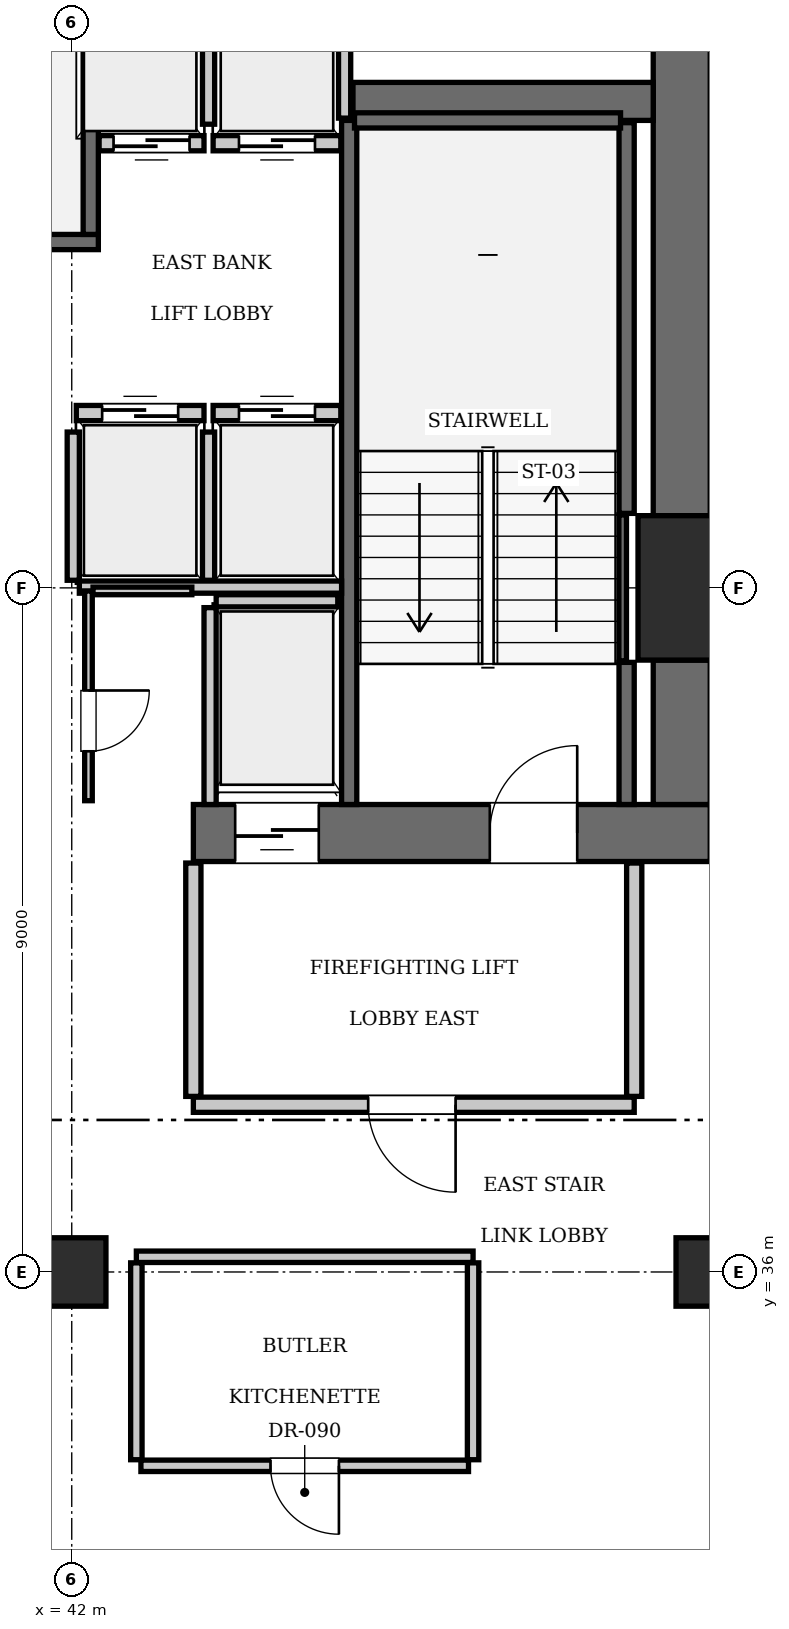
"""IFC4 building model, lengths in metres.
Left out: names, types, materials, properties, quantities, classifications, styles, units other than length and angle.
Written with IfcOpenShell. Run it as: python <this file> out.ifc"""

import sys

from ifc_helpers import new_model, si_unit, direction, frame, frame_2d, origin, origin_2d, place, context, subcontext, project, spatial, rectangle, extrude, element, fill, save


model = new_model("IFC4")
c1 = context("Model", 3, precision=1e-05, world=origin(), true_north=direction((0.0, 1.0)))
c2 = subcontext(c1, "Body", "Model", "MODEL_VIEW")
j1 = project(units=[si_unit("LENGTHUNIT", "METRE"), si_unit("PLANEANGLEUNIT", "RADIAN")], contexts=[c1])
p1 = place(None, origin())
s1 = spatial("IfcSite", under=j1, at=p1, CompositionType="ELEMENT")
p2 = place(p1, origin())
s2 = spatial("IfcBuilding", under=s1, at=p2, CompositionType="ELEMENT")
p3 = place(p2, frame((0.0, 0.0, 146.65)))
s3 = spatial("IfcBuildingStorey", under=s2, at=p3, CompositionType="ELEMENT", Elevation=146.65)
p4 = place(p3, frame((50.4, 45.0, 0.0), z_axis=(0.0, 0.0, 1.0), x_axis=(1.0, 0.0, 0.0)))
e1 = element("IfcColumn", 1, at=p4, inside=s3, PredefinedType="COLUMN", context=c2, shape_type="SweptSolid", body=[
    extrude(rectangle(XDim=1.9, YDim=1.9, at=origin_2d()), origin(), (0.0, 0.0, 1.0), 3.85),
])
p5 = place(p3, frame((43.6, 41.775, 0.0), z_axis=(0.0, 0.0, 1.0), x_axis=(1.0, 0.0, 0.0)))
e2 = element("IfcWall", 2, at=p5, inside=s3, PredefinedType="SHEAR", context=c2, shape_type="SweptSolid", body=[
    extrude(rectangle(XDim=6.8, YDim=0.75, at=frame_2d((3.4, 0.0))), origin(), (0.0, 0.0, 1.0), 3.85),
])
p6 = place(p5, frame((3.9, 0.0, 0.0)))
e3 = element("IfcOpeningElement", 3, at=p6, cuts=e2, PredefinedType="OPENING", context=c2, shape_type="SweptSolid", body=[
    extrude(rectangle(XDim=1.15, YDim=2.15, at=frame_2d((0.575, 1.075))), frame((0.0, 0.385, 0.0), z_axis=(0.0, -1.0, 0.0), x_axis=(1.0, 0.0, 0.0)), (0.0, 0.0, 1.0), 0.77),
])
p7 = place(p5, frame((0.55, 0.0, 0.0)))
e4 = element("IfcOpeningElement", 4, at=p7, cuts=e2, PredefinedType="OPENING", context=c2, shape_type="SweptSolid", body=[
    extrude(rectangle(XDim=1.1, YDim=2.2, at=frame_2d((0.55, 1.1))), frame((0.0, 0.385, 0.0), z_axis=(0.0, -1.0, 0.0), x_axis=(1.0, 0.0, 0.0)), (0.0, 0.0, 1.0), 0.77),
])
p8 = place(p3, frame((50.025, 42.15, 0.0), z_axis=(0.0, 0.0, 1.0), x_axis=(0.0, 1.0, 0.0)))
e5 = element("IfcWall", 5, at=p8, inside=s3, PredefinedType="SHEAR", context=c2, shape_type="SweptSolid", body=[
    extrude(rectangle(XDim=1.9, YDim=0.75, at=frame_2d((0.95, 0.0))), origin(), (0.0, 0.0, 1.0), 3.85),
])
p9 = place(p3, frame((50.025, 45.95, 0.0), z_axis=(0.0, 0.0, 1.0), x_axis=(0.0, 1.0, 0.0)))
e6 = element("IfcWall", 6, at=p9, inside=s3, PredefinedType="SHEAR", context=c2, shape_type="SweptSolid", body=[
    extrude(rectangle(XDim=7.3, YDim=0.75, at=frame_2d((3.65, 0.0))), origin(), (0.0, 0.0, 1.0), 3.85),
])
p10 = place(p3, frame((45.7, 51.4, 0.0), z_axis=(0.0, 0.0, 1.0), x_axis=(1.0, 0.0, 0.0)))
e7 = element("IfcWall", 7, at=p10, inside=s3, PredefinedType="SHEAR", context=c2, shape_type="SweptSolid", body=[
    extrude(rectangle(XDim=3.95, YDim=0.5, at=frame_2d((1.975, 0.0))), origin(), (0.0, 0.0, 1.0), 3.85),
])
for number, where, z_axis, x_axis in (
    (8, (42.0, 36.0, 0.0), (0.0, 0.0, 1.0), (1.0, 0.0, 0.0)),
    (9, (50.4, 36.0, 0.0), (0.0, 0.0, 1.0), (1.0, 0.0, 0.0)),
):
    element("IfcColumn", number, at=place(p3, frame(where, z_axis=z_axis, x_axis=x_axis)), inside=s3, PredefinedType="COLUMN", context=c2, shape_type="SweptSolid", body=[
        extrude(rectangle(XDim=0.9, YDim=0.9, at=origin_2d()), origin(), (0.0, 0.0, 1.0), 3.85),
    ])
p11 = place(p3, frame((33.25, 49.55, 0.0), z_axis=(0.0, 0.0, 1.0), x_axis=(1.0, 0.0, 0.0)))
e10 = element("IfcWall", 10, at=p11, inside=s3, PredefinedType="SOLIDWALL", context=c2, shape_type="SweptSolid", body=[
    extrude(rectangle(XDim=9.1, YDim=0.2, at=frame_2d((4.55, 0.0))), origin(), (0.0, 0.0, 1.0), 3.61),
])
p12 = place(p3, frame((42.25, 49.65, 0.0), z_axis=(0.0, 0.0, 1.0), x_axis=(0.0, 1.0, 0.0)))
e11 = element("IfcWall", 11, at=p12, inside=s3, PredefinedType="SOLIDWALL", context=c2, shape_type="SweptSolid", body=[
    extrude(rectangle(XDim=3.6, YDim=0.2, at=frame_2d((1.8, 0.0))), origin(), (0.0, 0.0, 1.0), 3.61),
])
p13 = place(p3, frame((45.65, 42.15, 0.0), z_axis=(0.0, 0.0, 1.0), x_axis=(0.0, 1.0, 0.0)))
e12 = element("IfcWall", 12, at=p13, inside=s3, PredefinedType="SOLIDWALL", context=c2, shape_type="SweptSolid", body=[
    extrude(rectangle(XDim=9.0, YDim=0.2, at=frame_2d((4.5, 0.0))), origin(), (0.0, 0.0, 1.0), 3.61),
])
p14 = place(p3, frame((49.3, 42.15, 0.0), z_axis=(0.0, 0.0, 1.0), x_axis=(0.0, 1.0, 0.0)))
e13 = element("IfcWall", 13, at=p14, inside=s3, PredefinedType="SOLIDWALL", context=c2, shape_type="SweptSolid", body=[
    extrude(rectangle(XDim=1.87, YDim=0.2, at=frame_2d((0.935, 0.0))), origin(), (0.0, 0.0, 1.0), 3.61),
])
p15 = place(p3, frame((49.3, 45.98, 0.0), z_axis=(0.0, 0.0, 1.0), x_axis=(0.0, 1.0, 0.0)))
e14 = element("IfcWall", 14, at=p15, inside=s3, PredefinedType="SOLIDWALL", context=c2, shape_type="SweptSolid", body=[
    extrude(rectangle(XDim=5.14, YDim=0.2, at=frame_2d((2.57, 0.0))), origin(), (0.0, 0.0, 1.0), 3.61),
])
p16 = place(p3, frame((45.72, 51.15, 0.0), z_axis=(0.0, 0.0, 1.0), x_axis=(1.0, 0.0, 0.0)))
e15 = element("IfcWall", 15, at=p16, inside=s3, PredefinedType="SOLIDWALL", context=c2, shape_type="SweptSolid", body=[
    extrude(rectangle(XDim=3.5, YDim=0.2, at=frame_2d((1.75, 0.0))), origin(), (0.0, 0.0, 1.0), 3.61),
])
p17 = place(p3, frame((49.248, 44.04, 0.0), z_axis=(0.0, 0.0, 1.0), x_axis=(0.0, 1.0, 0.0)))
e16 = element("IfcWall", 16, at=p17, inside=s3, PredefinedType="SOLIDWALL", context=c2, shape_type="SweptSolid", body=[
    extrude(rectangle(XDim=1.92, YDim=0.1, at=frame_2d((0.96, 0.0))), origin(), (0.0, 0.0, 1.0), 3.61),
])
p18 = place(p3, frame((42.06, 47.3, 0.0), z_axis=(0.0, 0.0, 1.0), x_axis=(1.0, 0.0, 0.0)))
e17 = element("IfcWall", 17, at=p18, inside=s3, PredefinedType="SOLIDWALL", context=c2, shape_type="SweptSolid", body=[
    extrude(rectangle(XDim=1.68, YDim=0.2, at=frame_2d((0.84, 0.0))), origin(), (0.0, 0.0, 1.0), 3.61),
])
p19 = place(p18, frame((0.34, 0.0, 0.0)))
e18 = element("IfcOpeningElement", 18, at=p19, cuts=e17, PredefinedType="OPENING", context=c2, shape_type="SweptSolid", body=[
    extrude(rectangle(XDim=1.0, YDim=2.15, at=frame_2d((0.5, 1.075))), frame((0.0, 0.11, 0.0), z_axis=(0.0, -1.0, 0.0), x_axis=(1.0, 0.0, 0.0)), (0.0, 0.0, 1.0), 0.22),
])
p20 = place(p3, frame((43.86, 47.3, 0.0), z_axis=(0.0, 0.0, 1.0), x_axis=(1.0, 0.0, 0.0)))
e19 = element("IfcWall", 19, at=p20, inside=s3, PredefinedType="SOLIDWALL", context=c2, shape_type="SweptSolid", body=[
    extrude(rectangle(XDim=1.68, YDim=0.2, at=frame_2d((0.84, 0.0))), origin(), (0.0, 0.0, 1.0), 3.61),
])
p21 = place(p20, frame((0.34, 0.0, 0.0)))
e20 = element("IfcOpeningElement", 20, at=p21, cuts=e19, PredefinedType="OPENING", context=c2, shape_type="SweptSolid", body=[
    extrude(rectangle(XDim=1.0, YDim=2.15, at=frame_2d((0.5, 1.075))), frame((0.0, 0.11, 0.0), z_axis=(0.0, -1.0, 0.0), x_axis=(1.0, 0.0, 0.0)), (0.0, 0.0, 1.0), 0.22),
])
p22 = place(p3, frame((42.36, 50.85, 0.0), z_axis=(0.0, 0.0, 1.0), x_axis=(1.0, 0.0, 0.0)))
e21 = element("IfcWall", 21, at=p22, inside=s3, PredefinedType="SOLIDWALL", context=c2, shape_type="SweptSolid", body=[
    extrude(rectangle(XDim=1.38, YDim=0.2, at=frame_2d((0.69, 0.0))), origin(), (0.0, 0.0, 1.0), 3.61),
])
p23 = place(p22, frame((0.19, 0.0, 0.0)))
e22 = element("IfcOpeningElement", 22, at=p23, cuts=e21, PredefinedType="OPENING", context=c2, shape_type="SweptSolid", body=[
    extrude(rectangle(XDim=1.0, YDim=2.15, at=frame_2d((0.5, 1.075))), frame((0.0, 0.11, 0.0), z_axis=(0.0, -1.0, 0.0), x_axis=(1.0, 0.0, 0.0)), (0.0, 0.0, 1.0), 0.22),
])
p24 = place(p3, frame((43.86, 50.85, 0.0), z_axis=(0.0, 0.0, 1.0), x_axis=(1.0, 0.0, 0.0)))
e23 = element("IfcWall", 23, at=p24, inside=s3, PredefinedType="SOLIDWALL", context=c2, shape_type="SweptSolid", body=[
    extrude(rectangle(XDim=1.68, YDim=0.2, at=frame_2d((0.84, 0.0))), origin(), (0.0, 0.0, 1.0), 3.61),
])
p25 = place(p24, frame((0.34, 0.0, 0.0)))
e24 = element("IfcOpeningElement", 24, at=p25, cuts=e23, PredefinedType="OPENING", context=c2, shape_type="SweptSolid", body=[
    extrude(rectangle(XDim=1.0, YDim=2.15, at=frame_2d((0.5, 1.075))), frame((0.0, 0.11, 0.0), z_axis=(0.0, -1.0, 0.0), x_axis=(1.0, 0.0, 0.0)), (0.0, 0.0, 1.0), 0.22),
])
p26 = place(p3, frame((43.9, 44.83, 0.0), z_axis=(0.0, 0.0, 1.0), x_axis=(1.0, 0.0, 0.0)))
e25 = element("IfcWall", 25, at=p26, inside=s3, PredefinedType="SOLIDWALL", context=c2, shape_type="SweptSolid", body=[
    extrude(rectangle(XDim=1.6, YDim=0.16, at=frame_2d((0.8, 0.0))), origin(), (0.0, 0.0, 1.0), 3.61),
])
p27 = place(p3, frame((43.82, 42.15, 0.0), z_axis=(0.0, 0.0, 1.0), x_axis=(0.0, 1.0, 0.0)))
e26 = element("IfcWall", 26, at=p27, inside=s3, PredefinedType="SOLIDWALL", context=c2, shape_type="SweptSolid", body=[
    extrude(rectangle(XDim=2.59, YDim=0.16, at=frame_2d((1.295, 0.0))), origin(), (0.0, 0.0, 1.0), 3.61),
])
for number, where, z_axis, x_axis in (
    (27, (42.02, 45.1, 0.0), (0.0, 0.0, 1.0), (0.0, 1.0, 0.0)),
    (28, (43.8, 45.1, 0.0), (0.0, 0.0, 1.0), (0.0, 1.0, 0.0)),
):
    element("IfcWall", number, at=place(p3, frame(where, z_axis=z_axis, x_axis=x_axis)), inside=s3, PredefinedType="SOLIDWALL", context=c2, shape_type="SweptSolid", body=[
        extrude(rectangle(XDim=1.95, YDim=0.16, at=frame_2d((0.975, 0.0))), origin(), (0.0, 0.0, 1.0), 3.61),
    ])
p28 = place(p3, frame((42.1, 45.01, 0.0), z_axis=(0.0, 0.0, 1.0), x_axis=(1.0, 0.0, 0.0)))
e29 = element("IfcWall", 29, at=p28, inside=s3, PredefinedType="SOLIDWALL", context=c2, shape_type="SweptSolid", body=[
    extrude(rectangle(XDim=3.45, YDim=0.16, at=frame_2d((1.725, 0.0))), origin(), (0.0, 0.0, 1.0), 3.61),
])
p29 = place(p3, frame((45.59, 51.18, 0.0), z_axis=(0.0, 0.0, 1.0), x_axis=(0.0, 1.0, 0.0)))
e30 = element("IfcWall", 30, at=p29, inside=s3, PredefinedType="SOLIDWALL", context=c2, shape_type="SweptSolid", body=[
    extrude(rectangle(XDim=2.07, YDim=0.16, at=frame_2d((1.035, 0.0))), origin(), (0.0, 0.0, 1.0), 3.61),
])
p30 = place(p3, frame((43.8, 51.1, 0.0), z_axis=(0.0, 0.0, 1.0), x_axis=(0.0, 1.0, 0.0)))
e31 = element("IfcWall", 31, at=p30, inside=s3, PredefinedType="SOLIDWALL", context=c2, shape_type="SweptSolid", body=[
    extrude(rectangle(XDim=2.15, YDim=0.16, at=frame_2d((1.075, 0.0))), origin(), (0.0, 0.0, 1.0), 3.61),
])
p31 = place(p3, frame((43.6, 38.2, 0.0), z_axis=(0.0, 0.0, 1.0), x_axis=(1.0, 0.0, 0.0)))
e32 = element("IfcWall", 32, at=p31, inside=s3, PredefinedType="PARTITIONING", context=c2, shape_type="SweptSolid", body=[
    extrude(rectangle(XDim=5.8, YDim=0.2, at=frame_2d((2.9, 0.0))), origin(), (0.0, 0.0, 1.0), 3.61),
])
p32 = place(p31, frame((2.3, 0.0, 0.0)))
e33 = element("IfcOpeningElement", 33, at=p32, cuts=e32, PredefinedType="OPENING", context=c2, shape_type="SweptSolid", body=[
    extrude(rectangle(XDim=1.15, YDim=2.15, at=frame_2d((0.575, 1.075))), frame((0.0, 0.11, 0.0), z_axis=(0.0, -1.0, 0.0), x_axis=(1.0, 0.0, 0.0)), (0.0, 0.0, 1.0), 0.22),
])
for number, where, z_axis, x_axis in (
    (34, (43.6, 38.31, 0.0), (0.0, 0.0, 1.0), (0.0, 1.0, 0.0)),
    (35, (49.4, 38.31, 0.0), (0.0, 0.0, 1.0), (0.0, 1.0, 0.0)),
):
    element("IfcWall", number, at=place(p3, frame(where, z_axis=z_axis, x_axis=x_axis)), inside=s3, PredefinedType="PARTITIONING", context=c2, shape_type="SweptSolid", body=[
        extrude(rectangle(XDim=3.07, YDim=0.2, at=frame_2d((1.535, 0.0))), origin(), (0.0, 0.0, 1.0), 3.61),
    ])
p33 = place(p3, frame((42.22, 42.2, 0.0), z_axis=(0.0, 0.0, 1.0), x_axis=(0.0, 1.0, 0.0)))
e36 = element("IfcWall", 36, at=p33, inside=s3, PredefinedType="PARTITIONING", context=c2, shape_type="SweptSolid", body=[
    extrude(rectangle(XDim=2.76, YDim=0.1, at=frame_2d((1.38, 0.0))), origin(), (0.0, 0.0, 1.0), 3.61),
])
p34 = place(p33, frame((0.65, 0.0, 0.0)))
e37 = element("IfcOpeningElement", 37, at=p34, cuts=e36, PredefinedType="OPENING", context=c2, shape_type="SweptSolid", body=[
    extrude(rectangle(XDim=0.8, YDim=2.05, at=frame_2d((0.4, 1.025))), frame((0.0, 0.06, 0.0), z_axis=(0.0, -1.0, 0.0), x_axis=(1.0, 0.0, 0.0)), (0.0, 0.0, 1.0), 0.12),
])
p35 = place(p3, frame((42.28, 44.96, 0.0), z_axis=(0.0, 0.0, 1.0), x_axis=(1.0, 0.0, 0.0)))
e38 = element("IfcWall", 38, at=p35, inside=s3, PredefinedType="PARTITIONING", context=c2, shape_type="SweptSolid", body=[
    extrude(rectangle(XDim=1.3, YDim=0.1, at=frame_2d((0.65, 0.0))), origin(), (0.0, 0.0, 1.0), 3.61),
])
p36 = place(p3, frame((42.85, 36.2, 0.0), z_axis=(0.0, 0.0, 1.0), x_axis=(1.0, 0.0, 0.0)))
e39 = element("IfcWall", 39, at=p36, inside=s3, PredefinedType="PARTITIONING", context=c2, shape_type="SweptSolid", body=[
    extrude(rectangle(XDim=4.43, YDim=0.15, at=frame_2d((2.215, 0.0))), origin(), (0.0, 0.0, 1.0), 3.61),
])
for number, where, z_axis, x_axis in (
    (40, (42.85, 33.53, 0.0), (0.0, 0.0, 1.0), (0.0, 1.0, 0.0)),
    (41, (47.28, 33.53, 0.0), (0.0, 0.0, 1.0), (0.0, 1.0, 0.0)),
):
    element("IfcWall", number, at=place(p3, frame(where, z_axis=z_axis, x_axis=x_axis)), inside=s3, PredefinedType="PARTITIONING", context=c2, shape_type="SweptSolid", body=[
        extrude(rectangle(XDim=2.59, YDim=0.15, at=frame_2d((1.295, 0.0))), origin(), (0.0, 0.0, 1.0), 3.61),
    ])
p37 = place(p3, frame((42.91, 33.45, 0.0), z_axis=(0.0, 0.0, 1.0), x_axis=(1.0, 0.0, 0.0)))
e42 = element("IfcWall", 42, at=p37, inside=s3, PredefinedType="PARTITIONING", context=c2, shape_type="SweptSolid", body=[
    extrude(rectangle(XDim=4.31, YDim=0.15, at=frame_2d((2.155, 0.0))), origin(), (0.0, 0.0, 1.0), 3.61),
])
p38 = place(p37, frame((1.705, 0.0, 0.0)))
e43 = element("IfcOpeningElement", 43, at=p38, cuts=e42, PredefinedType="OPENING", context=c2, shape_type="SweptSolid", body=[
    extrude(rectangle(XDim=0.9, YDim=2.1, at=frame_2d((0.45, 1.05))), frame((0.0, 0.085, 0.0), z_axis=(0.0, -1.0, 0.0), x_axis=(1.0, 0.0, 0.0)), (0.0, 0.0, 1.0), 0.17),
])
p39 = place(p6, origin())
e44 = element("IfcDoor", 44, at=p39, inside=s3, OperationType="SINGLE_SWING_RIGHT", PredefinedType="DOOR", context=c2, shape_type="SweptSolid", body=[
    extrude(rectangle(XDim=1.15, YDim=2.15, at=frame_2d((0.575, 1.075))), frame((0.0, 0.025, 0.0), z_axis=(0.0, -1.0, 0.0), x_axis=(1.0, 0.0, 0.0)), (0.0, 0.0, 1.0), 0.05),
])
fill(e3, e44)
p40 = place(p19, origin())
e45 = element("IfcDoor", 45, at=p40, inside=s3, OperationType="SLIDING_TO_LEFT", PredefinedType="DOOR", context=c2, shape_type="SweptSolid", body=[
    extrude(rectangle(XDim=1.0, YDim=2.15, at=frame_2d((0.5, 1.075))), frame((0.0, 0.025, 0.0), z_axis=(0.0, -1.0, 0.0), x_axis=(1.0, 0.0, 0.0)), (0.0, 0.0, 1.0), 0.05),
])
fill(e18, e45)
p41 = place(p21, origin())
e46 = element("IfcDoor", 46, at=p41, inside=s3, OperationType="SLIDING_TO_LEFT", PredefinedType="DOOR", context=c2, shape_type="SweptSolid", body=[
    extrude(rectangle(XDim=1.0, YDim=2.15, at=frame_2d((0.5, 1.075))), frame((0.0, 0.025, 0.0), z_axis=(0.0, -1.0, 0.0), x_axis=(1.0, 0.0, 0.0)), (0.0, 0.0, 1.0), 0.05),
])
fill(e20, e46)
p42 = place(p23, frame((1.0, 0.0, 0.0), z_axis=(0.0, 0.0, 1.0), x_axis=(-1.0, 0.0, 0.0)))
e47 = element("IfcDoor", 47, at=p42, inside=s3, OperationType="SLIDING_TO_LEFT", PredefinedType="DOOR", context=c2, shape_type="SweptSolid", body=[
    extrude(rectangle(XDim=1.0, YDim=2.15, at=frame_2d((0.5, 1.075))), frame((0.0, 0.025, 0.0), z_axis=(0.0, -1.0, 0.0), x_axis=(1.0, 0.0, 0.0)), (0.0, 0.0, 1.0), 0.05),
])
fill(e22, e47)
p43 = place(p25, frame((1.0, 0.0, 0.0), z_axis=(0.0, 0.0, 1.0), x_axis=(-1.0, 0.0, 0.0)))
e48 = element("IfcDoor", 48, at=p43, inside=s3, OperationType="SLIDING_TO_LEFT", PredefinedType="DOOR", context=c2, shape_type="SweptSolid", body=[
    extrude(rectangle(XDim=1.0, YDim=2.15, at=frame_2d((0.5, 1.075))), frame((0.0, 0.025, 0.0), z_axis=(0.0, -1.0, 0.0), x_axis=(1.0, 0.0, 0.0)), (0.0, 0.0, 1.0), 0.05),
])
fill(e24, e48)
p44 = place(p7, frame((1.1, 0.0, 0.0), z_axis=(0.0, 0.0, 1.0), x_axis=(-1.0, 0.0, 0.0)))
e49 = element("IfcDoor", 49, at=p44, inside=s3, OperationType="SLIDING_TO_LEFT", PredefinedType="DOOR", context=c2, shape_type="SweptSolid", body=[
    extrude(rectangle(XDim=1.1, YDim=2.2, at=frame_2d((0.55, 1.1))), frame((0.0, 0.025, 0.0), z_axis=(0.0, -1.0, 0.0), x_axis=(1.0, 0.0, 0.0)), (0.0, 0.0, 1.0), 0.05),
])
fill(e4, e49)
p45 = place(p32, frame((1.15, 0.0, 0.0), z_axis=(0.0, 0.0, 1.0), x_axis=(-1.0, 0.0, 0.0)))
e50 = element("IfcDoor", 50, at=p45, inside=s3, OperationType="SINGLE_SWING_LEFT", PredefinedType="DOOR", context=c2, shape_type="SweptSolid", body=[
    extrude(rectangle(XDim=1.15, YDim=2.15, at=frame_2d((0.575, 1.075))), frame((0.0, 0.025, 0.0), z_axis=(0.0, -1.0, 0.0), x_axis=(1.0, 0.0, 0.0)), (0.0, 0.0, 1.0), 0.05),
])
fill(e33, e50)
p46 = place(p34, frame((0.8, 0.0, 0.0), z_axis=(0.0, 0.0, 1.0), x_axis=(-1.0, 0.0, 0.0)))
e51 = element("IfcDoor", 51, at=p46, inside=s3, OperationType="SINGLE_SWING_LEFT", PredefinedType="DOOR", context=c2, shape_type="SweptSolid", body=[
    extrude(rectangle(XDim=0.8, YDim=2.05, at=frame_2d((0.4, 1.025))), frame((0.0, 0.025, 0.0), z_axis=(0.0, -1.0, 0.0), x_axis=(1.0, 0.0, 0.0)), (0.0, 0.0, 1.0), 0.05),
])
fill(e37, e51)
p47 = place(p38, frame((0.9, 0.0, 0.0), z_axis=(0.0, 0.0, 1.0), x_axis=(-1.0, 0.0, 0.0)))
e52 = element("IfcDoor", 52, at=p47, inside=s3, OperationType="SINGLE_SWING_LEFT", PredefinedType="DOOR", context=c2, shape_type="SweptSolid", body=[
    extrude(rectangle(XDim=0.9, YDim=2.1, at=frame_2d((0.45, 1.05))), frame((0.0, 0.025, 0.0), z_axis=(0.0, -1.0, 0.0), x_axis=(1.0, 0.0, 0.0)), (0.0, 0.0, 1.0), 0.05),
])
fill(e43, e52)
save(model, sys.argv[1])
